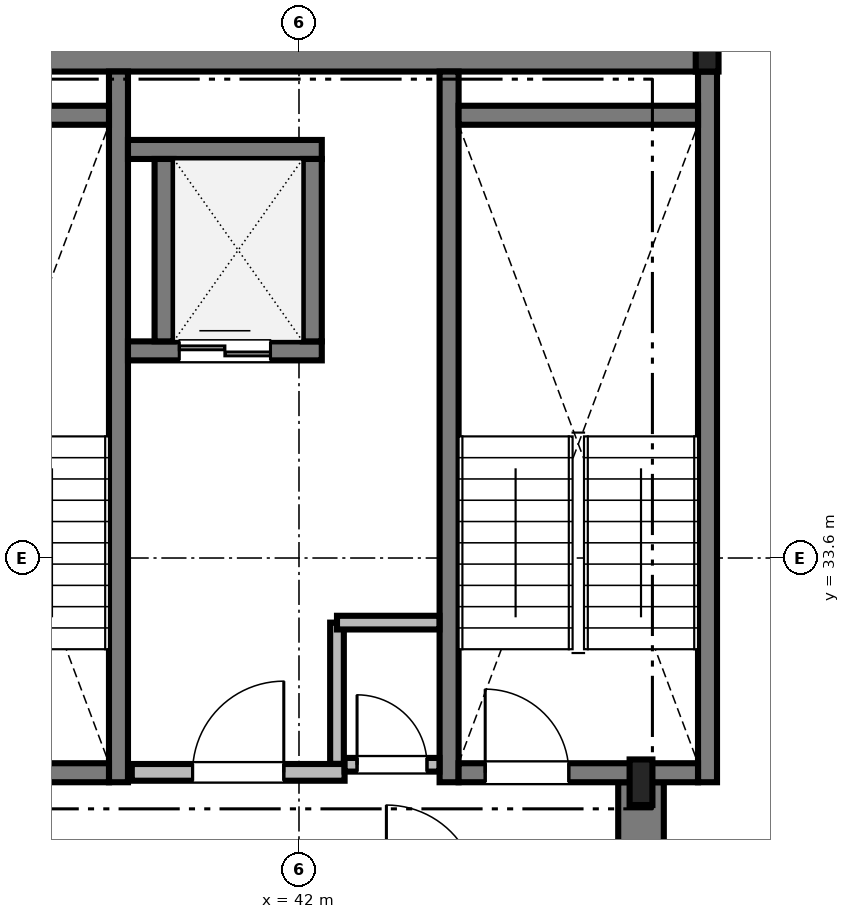
"""IFC4 building model, lengths in metres.
Left out: names, types, materials, properties, quantities, classifications, styles, units other than length and angle.
Written with IfcOpenShell. Run it as: python <this file> out.ifc"""

import sys

from ifc_helpers import new_model, si_unit, direction, frame, frame_2d, origin, origin_2d, place, context, subcontext, project, spatial, rectangle, i_section, extrude, source, transform, mapped, element, fill, save


model = new_model("IFC4")
c1 = context("Model", 3, precision=1e-05, world=origin(), true_north=direction((0.0, 1.0)))
c2 = subcontext(c1, "Body", "Model", "MODEL_VIEW")
j1 = project(units=[si_unit("LENGTHUNIT", "METRE"), si_unit("PLANEANGLEUNIT", "RADIAN")], contexts=[c1])
p1 = place(None, origin())
s1 = spatial("IfcSite", under=j1, at=p1, CompositionType="ELEMENT")
p2 = place(p1, origin())
s2 = spatial("IfcBuilding", under=s1, at=p2, CompositionType="ELEMENT")
p3 = place(p2, frame((0.0, 0.0, 278.25)))
s3 = spatial("IfcBuildingStorey", under=s2, at=p3, CompositionType="ELEMENT", Elevation=278.25)
m1 = source(origin(), c2, "Body", "SweptSolid", [
    extrude(rectangle(XDim=17.52, YDim=0.6, at=frame_2d((8.76, 0.0))), origin(), (0.0, 0.0, 1.0), 3.3),
])
p4 = place(p3, frame((29.85, 40.3, 0.0), z_axis=(0.0, 0.0, 1.0), x_axis=(1.0, 0.0, 0.0)))
e1 = element("IfcWall", 1, at=p4, inside=s3, PredefinedType="SHEAR", context=c2, shape_type="MappedRepresentation", body=[
    mapped(m1, transform((0.0, 0.0, 0.0), scale=1.0)),
])
m2 = source(origin(), c2, "Body", "SweptSolid", [
    extrude(rectangle(XDim=13.15, YDim=0.6, at=frame_2d((6.575, 0.0))), origin(), (0.0, 0.0, 1.0), 3.3),
])
p5 = place(p3, frame((46.5, 17.5, 0.0), z_axis=(0.0, 0.0, 1.0), x_axis=(0.0, 1.0, 0.0)))
e2 = element("IfcWall", 2, at=p5, inside=s3, PredefinedType="SHEAR", context=c2, shape_type="MappedRepresentation", body=[
    mapped(m2, transform((0.0, 0.0, 0.0), scale=1.0)),
])
m3 = source(origin(), c2, "Body", "SweptSolid", [
    extrude(i_section(OverallWidth=0.3, OverallDepth=0.6, WebThickness=0.015, FlangeThickness=0.03, FilletRadius=0.027, at=origin_2d()), origin(), (0.0, 0.0, 1.0), 3.3),
])
for number, where, z_axis, x_axis in (
    (3, (46.5, 30.65, 0.0), (0.0, 0.0, 1.0), (1.0, 0.0, 0.0)),
    (4, (47.37, 40.3, 0.0), (0.0, 0.0, 1.0), (1.0, 0.0, 0.0)),
):
    element("IfcColumn", number, at=place(p3, frame(where, z_axis=z_axis, x_axis=x_axis)), inside=s3, PredefinedType="COLUMN", context=c2, shape_type="MappedRepresentation", body=[
        mapped(m3, transform((0.0, 0.0, 0.0), scale=1.0)),
    ])
m4 = source(origin(), c2, "Body", "SweptSolid", [
    extrude(rectangle(XDim=9.35, YDim=0.25, at=frame_2d((4.675, 0.0))), origin(), (0.0, 0.0, 1.0), 3.75),
])
p6 = place(p3, frame((39.625, 30.65, 0.0), z_axis=(0.0, 0.0, 1.0), x_axis=(0.0, 1.0, 0.0)))
e5 = element("IfcWall", 5, at=p6, inside=s3, PredefinedType="SOLIDWALL", context=c2, shape_type="MappedRepresentation", body=[
    mapped(m4, transform((0.0, 0.0, 0.0), scale=1.0)),
])
m5 = source(origin(), c2, "Body", "SweptSolid", [
    extrude(rectangle(XDim=3.15, YDim=0.25, at=frame_2d((1.575, 0.0))), origin(), (0.0, 0.0, 1.0), 3.75),
])
p7 = place(p3, frame((36.35, 39.425, 0.0), z_axis=(0.0, 0.0, 1.0), x_axis=(1.0, 0.0, 0.0)))
e6 = element("IfcWall", 6, at=p7, inside=s3, PredefinedType="SOLIDWALL", context=c2, shape_type="MappedRepresentation", body=[
    mapped(m5, transform((0.0, 0.0, 0.0), scale=1.0)),
])
p8 = place(p3, frame((36.35, 30.775, 0.0), z_axis=(0.0, 0.0, 1.0), x_axis=(1.0, 0.0, 0.0)))
e7 = element("IfcWall", 7, at=p8, inside=s3, PredefinedType="SOLIDWALL", context=c2, shape_type="MappedRepresentation", body=[
    mapped(m5, transform((0.0, 0.0, 0.0), scale=1.0)),
])
m6 = source(origin(), c2, "Body", "SweptSolid", [
    extrude(rectangle(XDim=1.1, YDim=2.2, at=frame_2d((0.55, 1.1))), frame((0.0, 0.135, 0.0), z_axis=(0.0, -1.0, 0.0), x_axis=(1.0, 0.0, 0.0)), (0.0, 0.0, 1.0), 0.27),
])
p9 = place(p8, frame((0.35, 0.0, 0.0)))
e8 = element("IfcOpeningElement", 8, at=p9, cuts=e7, PredefinedType="OPENING", context=c2, shape_type="MappedRepresentation", body=[
    mapped(m6, transform((0.0, 0.0, 0.0), scale=1.0)),
])
for number, where, z_axis, x_axis in (
    (9, (43.975, 30.65, 0.0), (0.0, 0.0, 1.0), (0.0, 1.0, 0.0)),
    (10, (47.375, 30.65, 0.0), (0.0, 0.0, 1.0), (0.0, 1.0, 0.0)),
):
    element("IfcWall", number, at=place(p3, frame(where, z_axis=z_axis, x_axis=x_axis)), inside=s3, PredefinedType="SOLIDWALL", context=c2, shape_type="MappedRepresentation", body=[
        mapped(m4, transform((0.0, 0.0, 0.0), scale=1.0)),
    ])
p10 = place(p3, frame((44.1, 39.425, 0.0), z_axis=(0.0, 0.0, 1.0), x_axis=(1.0, 0.0, 0.0)))
e11 = element("IfcWall", 11, at=p10, inside=s3, PredefinedType="SOLIDWALL", context=c2, shape_type="MappedRepresentation", body=[
    mapped(m5, transform((0.0, 0.0, 0.0), scale=1.0)),
])
p11 = place(p3, frame((44.1, 30.775, 0.0), z_axis=(0.0, 0.0, 1.0), x_axis=(1.0, 0.0, 0.0)))
e12 = element("IfcWall", 12, at=p11, inside=s3, PredefinedType="SOLIDWALL", context=c2, shape_type="MappedRepresentation", body=[
    mapped(m5, transform((0.0, 0.0, 0.0), scale=1.0)),
])
p12 = place(p11, frame((0.35, 0.0, 0.0)))
e13 = element("IfcOpeningElement", 13, at=p12, cuts=e12, PredefinedType="OPENING", context=c2, shape_type="MappedRepresentation", body=[
    mapped(m6, transform((0.0, 0.0, 0.0), scale=1.0)),
])
m7 = source(origin(), c2, "Body", "SweptSolid", [
    extrude(rectangle(XDim=2.8, YDim=0.22, at=frame_2d((1.4, 0.0))), origin(), (0.0, 0.0, 1.0), 3.3),
])
p13 = place(p3, frame((39.8, 30.78, 0.0), z_axis=(0.0, 0.0, 1.0), x_axis=(1.0, 0.0, 0.0)))
e14 = element("IfcWall", 14, at=p13, inside=s3, PredefinedType="SOLIDWALL", context=c2, shape_type="MappedRepresentation", body=[
    mapped(m7, transform((0.0, 0.0, 0.0), scale=1.0)),
])
m8 = source(origin(), c2, "Body", "SweptSolid", [
    extrude(rectangle(XDim=1.2, YDim=2.2, at=frame_2d((0.6, 1.1))), frame((0.0, 0.12, 0.0), z_axis=(0.0, -1.0, 0.0), x_axis=(1.0, 0.0, 0.0)), (0.0, 0.0, 1.0), 0.24),
])
p14 = place(p13, frame((0.8, 0.0, 0.0)))
e15 = element("IfcOpeningElement", 15, at=p14, cuts=e14, PredefinedType="OPENING", context=c2, shape_type="MappedRepresentation", body=[
    mapped(m8, transform((0.0, 0.0, 0.0), scale=1.0)),
])
m9 = source(origin(), c2, "Body", "SweptSolid", [
    extrude(rectangle(XDim=2.55, YDim=0.25, at=frame_2d((1.275, 0.0))), origin(), (0.0, 0.0, 1.0), 3.3),
])
p15 = place(p3, frame((39.75, 36.325, 0.0), z_axis=(0.0, 0.0, 1.0), x_axis=(1.0, 0.0, 0.0)))
e16 = element("IfcWall", 16, at=p15, inside=s3, PredefinedType="SOLIDWALL", context=c2, shape_type="MappedRepresentation", body=[
    mapped(m9, transform((0.0, 0.0, 0.0), scale=1.0)),
])
m10 = source(origin(), c2, "Body", "SweptSolid", [
    extrude(rectangle(XDim=1.2, YDim=2.25, at=frame_2d((0.6, 1.125))), frame((0.0, 0.135, 0.0), z_axis=(0.0, -1.0, 0.0), x_axis=(1.0, 0.0, 0.0)), (0.0, 0.0, 1.0), 0.27),
])
p16 = place(p15, frame((0.675, 0.0, 0.0)))
e17 = element("IfcOpeningElement", 17, at=p16, cuts=e16, PredefinedType="OPENING", context=c2, shape_type="MappedRepresentation", body=[
    mapped(m10, transform((0.0, 0.0, 0.0), scale=1.0)),
])
p17 = place(p3, frame((39.75, 38.975, 0.0), z_axis=(0.0, 0.0, 1.0), x_axis=(1.0, 0.0, 0.0)))
e18 = element("IfcWall", 18, at=p17, inside=s3, PredefinedType="SOLIDWALL", context=c2, shape_type="MappedRepresentation", body=[
    mapped(m9, transform((0.0, 0.0, 0.0), scale=1.0)),
])
m11 = source(origin(), c2, "Body", "SweptSolid", [
    extrude(rectangle(XDim=2.4, YDim=0.25, at=frame_2d((1.2, 0.0))), origin(), (0.0, 0.0, 1.0), 3.3),
])
for number, where, z_axis, x_axis in (
    (19, (40.225, 36.45, 0.0), (0.0, 0.0, 1.0), (0.0, 1.0, 0.0)),
    (20, (42.175, 36.45, 0.0), (0.0, 0.0, 1.0), (0.0, 1.0, 0.0)),
):
    element("IfcWall", number, at=place(p3, frame(where, z_axis=z_axis, x_axis=x_axis)), inside=s3, PredefinedType="SOLIDWALL", context=c2, shape_type="MappedRepresentation", body=[
        mapped(m11, transform((0.0, 0.0, 0.0), scale=1.0)),
    ])
m12 = source(origin(), c2, "Body", "SweptSolid", [
    extrude(rectangle(XDim=1.248, YDim=0.18, at=frame_2d((0.624, 0.0))), origin(), (0.0, 0.0, 1.0), 3.3),
])
p18 = place(p3, frame((42.6, 30.88, 0.0), z_axis=(0.0, 0.0, 1.0), x_axis=(1.0, 0.0, 0.0)))
e21 = element("IfcWall", 21, at=p18, inside=s3, PredefinedType="PARTITIONING", context=c2, shape_type="MappedRepresentation", body=[
    mapped(m12, transform((0.0, 0.0, 0.0), scale=1.0)),
])
m13 = source(origin(), c2, "Body", "SweptSolid", [
    extrude(rectangle(XDim=0.92, YDim=2.1, at=frame_2d((0.46, 1.05))), frame((0.0, 0.1, 0.0), z_axis=(0.0, -1.0, 0.0), x_axis=(1.0, 0.0, 0.0)), (0.0, 0.0, 1.0), 0.2),
])
p19 = place(p18, frame((0.164, 0.0, 0.0)))
e22 = element("IfcOpeningElement", 22, at=p19, cuts=e21, PredefinedType="OPENING", context=c2, shape_type="MappedRepresentation", body=[
    mapped(m13, transform((0.0, 0.0, 0.0), scale=1.0)),
])
m14 = source(origin(), c2, "Body", "SweptSolid", [
    extrude(rectangle(XDim=1.858, YDim=0.18, at=frame_2d((0.929, 0.0))), origin(), (0.0, 0.0, 1.0), 3.3),
])
p20 = place(p3, frame((42.5, 30.892, 0.0), z_axis=(0.0, 0.0, 1.0), x_axis=(0.0, 1.0, 0.0)))
e23 = element("IfcWall", 23, at=p20, inside=s3, PredefinedType="PARTITIONING", context=c2, shape_type="MappedRepresentation", body=[
    mapped(m14, transform((0.0, 0.0, 0.0), scale=1.0)),
])
m15 = source(origin(), c2, "Body", "SweptSolid", [
    extrude(rectangle(XDim=1.348, YDim=0.18, at=frame_2d((0.674, 0.0))), origin(), (0.0, 0.0, 1.0), 3.3),
])
p21 = place(p3, frame((42.5, 32.75, 0.0), z_axis=(0.0, 0.0, 1.0), x_axis=(1.0, 0.0, 0.0)))
e24 = element("IfcWall", 24, at=p21, inside=s3, PredefinedType="PARTITIONING", context=c2, shape_type="MappedRepresentation", body=[
    mapped(m15, transform((0.0, 0.0, 0.0), scale=1.0)),
])
m16 = source(origin(), c2, "Body", "SweptSolid", [
    extrude(rectangle(XDim=1.1, YDim=2.2, at=frame_2d((0.55, 1.1))), frame((0.0, 0.025, 0.0), z_axis=(0.0, -1.0, 0.0), x_axis=(1.0, 0.0, 0.0)), (0.0, 0.0, 1.0), 0.05),
])
p22 = place(p12, origin())
e25 = element("IfcDoor", 25, at=p22, inside=s3, OperationType="SINGLE_SWING_LEFT", PredefinedType="DOOR", context=c2, shape_type="MappedRepresentation", body=[
    mapped(m16, transform((0.0, 0.0, 0.0), scale=1.0)),
])
fill(e13, e25)
m17 = source(origin(), c2, "Body", "SweptSolid", [
    extrude(rectangle(XDim=1.2, YDim=2.2, at=frame_2d((0.6, 1.1))), frame((0.0, 0.025, 0.0), z_axis=(0.0, -1.0, 0.0), x_axis=(1.0, 0.0, 0.0)), (0.0, 0.0, 1.0), 0.05),
])
p23 = place(p14, origin())
e26 = element("IfcDoor", 26, at=p23, inside=s3, OperationType="SINGLE_SWING_RIGHT", PredefinedType="DOOR", context=c2, shape_type="MappedRepresentation", body=[
    mapped(m17, transform((0.0, 0.0, 0.0), scale=1.0)),
])
fill(e15, e26)
m18 = source(origin(), c2, "Body", "SweptSolid", [
    extrude(rectangle(XDim=1.2, YDim=2.25, at=frame_2d((0.6, 1.125))), frame((0.0, 0.025, 0.0), z_axis=(0.0, -1.0, 0.0), x_axis=(1.0, 0.0, 0.0)), (0.0, 0.0, 1.0), 0.05),
])
p24 = place(p16, origin())
e27 = element("IfcDoor", 27, at=p24, inside=s3, OperationType="DOUBLE_DOOR_SLIDING", PredefinedType="DOOR", context=c2, shape_type="MappedRepresentation", body=[
    mapped(m18, transform((0.0, 0.0, 0.0), scale=1.0)),
])
fill(e17, e27)
m19 = source(origin(), c2, "Body", "SweptSolid", [
    extrude(rectangle(XDim=0.92, YDim=2.1, at=frame_2d((0.46, 1.05))), frame((0.0, 0.025, 0.0), z_axis=(0.0, -1.0, 0.0), x_axis=(1.0, 0.0, 0.0)), (0.0, 0.0, 1.0), 0.05),
])
p25 = place(p19, origin())
e28 = element("IfcDoor", 28, at=p25, inside=s3, OperationType="SINGLE_SWING_LEFT", PredefinedType="DOOR", context=c2, shape_type="MappedRepresentation", body=[
    mapped(m19, transform((0.0, 0.0, 0.0), scale=1.0)),
])
fill(e22, e28)
save(model, sys.argv[1])
